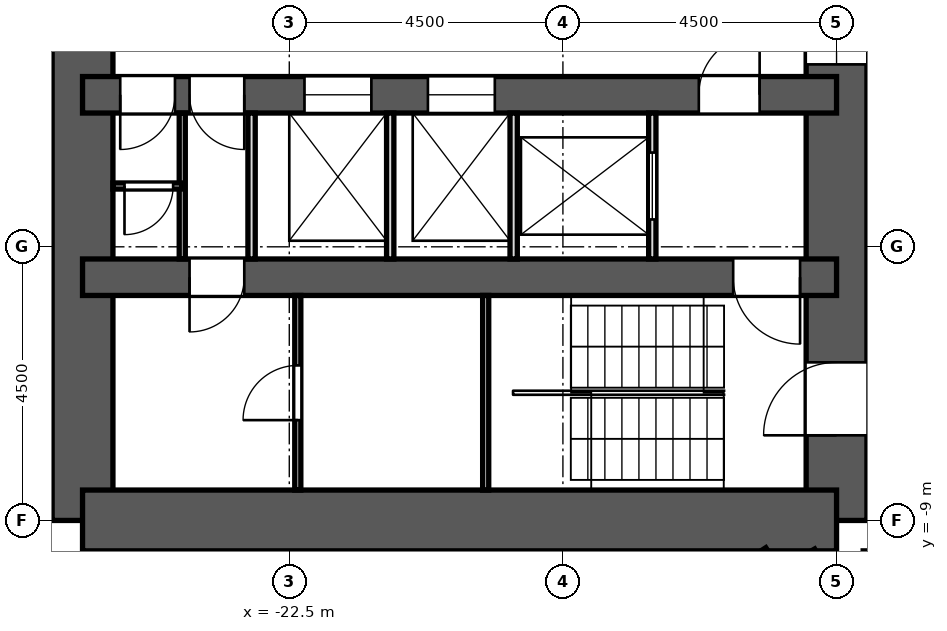
"""IFC4 building model, lengths in metres.
Left out: names, types, materials, properties, quantities, classifications, styles, units other than length and angle.
Written with IfcOpenShell. Run it as: python <this file> out.ifc"""

import sys

from ifc_helpers import new_model, si_unit, direction, frame, frame_2d, origin, place, context, subcontext, project, spatial, rectangle, extrude, element, fill, save


model = new_model("IFC4")
c1 = context("Model", 3, precision=1e-05, world=origin(), true_north=direction((0.0, 1.0)))
c2 = subcontext(c1, "Body", "Model", "MODEL_VIEW")
j1 = project(units=[si_unit("LENGTHUNIT", "METRE"), si_unit("PLANEANGLEUNIT", "RADIAN")], contexts=[c1])
p1 = place(None, origin())
s1 = spatial("IfcSite", under=j1, at=p1, CompositionType="ELEMENT")
p2 = place(p1, origin())
s2 = spatial("IfcBuilding", under=s1, at=p2, CompositionType="ELEMENT")
p3 = place(p2, frame((0.0, 0.0, 46.1)))
s3 = spatial("IfcBuildingStorey", under=s2, at=p3, CompositionType="ELEMENT", Elevation=46.1)
p4 = place(p3, frame((-13.5, -9.0, 0.0), z_axis=(0.0, 0.0, 1.0), x_axis=(0.0, 1.0, 0.0)))
e1 = element("IfcWall", 1, at=p4, inside=s3, PredefinedType="SHEAR", context=c2, shape_type="SweptSolid", body=[
    extrude(rectangle(XDim=18.0, YDim=1.0, at=frame_2d((9.0, 0.0))), origin(), (0.0, 0.0, 1.0), 3.3),
])
p5 = place(p4, frame((15.4, 0.0, 0.0)))
e2 = element("IfcOpeningElement", 2, at=p5, cuts=e1, PredefinedType="OPENING", context=c2, shape_type="SweptSolid", body=[
    extrude(rectangle(XDim=1.2, YDim=2.1, at=frame_2d((0.6, 1.05))), frame((0.0, 0.512, 0.0), z_axis=(0.0, -1.0, 0.0), x_axis=(1.0, 0.0, 0.0)), (0.0, 0.0, 1.0), 1.024),
])
p6 = place(p4, frame((1.4, 0.0, 0.0)))
e3 = element("IfcOpeningElement", 3, at=p6, cuts=e1, PredefinedType="OPENING", context=c2, shape_type="SweptSolid", body=[
    extrude(rectangle(XDim=1.2, YDim=2.1, at=frame_2d((0.6, 1.05))), frame((0.0, 0.512, 0.0), z_axis=(0.0, -1.0, 0.0), x_axis=(1.0, 0.0, 0.0)), (0.0, 0.0, 1.0), 1.024),
])
p7 = place(p4, frame((7.5, 0.0, 0.0)))
e4 = element("IfcOpeningElement", 4, at=p7, cuts=e1, PredefinedType="OPENING", context=c2, shape_type="SweptSolid", body=[
    extrude(rectangle(XDim=3.0, YDim=2.4, at=frame_2d((1.5, 1.2))), frame((0.0, 0.512, 0.0), z_axis=(0.0, -1.0, 0.0), x_axis=(1.0, 0.0, 0.0)), (0.0, 0.0, 1.0), 1.024),
])
p8 = place(p3, frame((-25.9, -9.0, 0.0), z_axis=(0.0, 0.0, 1.0), x_axis=(0.0, 1.0, 0.0)))
e5 = element("IfcWall", 5, at=p8, inside=s3, PredefinedType="SHEAR", context=c2, shape_type="SweptSolid", body=[
    extrude(rectangle(XDim=18.0, YDim=1.0, at=frame_2d((9.0, 0.0))), origin(), (0.0, 0.0, 1.0), 3.3),
])
p9 = place(p3, frame((-13.5, -9.0, 0.0), z_axis=(0.0, 0.0, 1.0), x_axis=(-1.0, 0.0, 0.0)))
e6 = element("IfcWall", 6, at=p9, inside=s3, PredefinedType="SHEAR", context=c2, shape_type="SweptSolid", body=[
    extrude(rectangle(XDim=12.4, YDim=1.0, at=frame_2d((6.2, 0.0))), origin(), (0.0, 0.0, 1.0), 3.3),
])
p10 = place(p3, frame((-13.5, -5.0, 0.0), z_axis=(0.0, 0.0, 1.0), x_axis=(-1.0, 0.0, 0.0)))
e7 = element("IfcWall", 7, at=p10, inside=s3, PredefinedType="SHEAR", context=c2, shape_type="SweptSolid", body=[
    extrude(rectangle(XDim=12.4, YDim=0.6, at=frame_2d((6.2, 0.0))), origin(), (0.0, 0.0, 1.0), 3.3),
])
p11 = place(p10, frame((9.74, 0.0, 0.0)))
e8 = element("IfcOpeningElement", 8, at=p11, cuts=e7, PredefinedType="OPENING", context=c2, shape_type="SweptSolid", body=[
    extrude(rectangle(XDim=0.9, YDim=2.1, at=frame_2d((0.45, 1.05))), frame((0.0, 0.312, 0.0), z_axis=(0.0, -1.0, 0.0), x_axis=(1.0, 0.0, 0.0)), (0.0, 0.0, 1.0), 0.624),
])
p12 = place(p10, frame((0.6, 0.0, 0.0)))
e9 = element("IfcOpeningElement", 9, at=p12, cuts=e7, PredefinedType="OPENING", context=c2, shape_type="SweptSolid", body=[
    extrude(rectangle(XDim=1.1, YDim=2.1, at=frame_2d((0.55, 1.05))), frame((0.0, 0.312, 0.0), z_axis=(0.0, -1.0, 0.0), x_axis=(1.0, 0.0, 0.0)), (0.0, 0.0, 1.0), 0.624),
])
p13 = place(p3, frame((-13.5, -2.0, 0.0), z_axis=(0.0, 0.0, 1.0), x_axis=(-1.0, 0.0, 0.0)))
e10 = element("IfcWall", 10, at=p13, inside=s3, PredefinedType="SHEAR", context=c2, shape_type="SweptSolid", body=[
    extrude(rectangle(XDim=12.4, YDim=0.6, at=frame_2d((6.2, 0.0))), origin(), (0.0, 0.0, 1.0), 3.3),
])
p14 = place(p13, frame((5.62, 0.0, 0.0)))
e11 = element("IfcOpeningElement", 11, at=p14, cuts=e10, PredefinedType="OPENING", context=c2, shape_type="SweptSolid", body=[
    extrude(rectangle(XDim=1.1, YDim=2.1, at=frame_2d((0.55, 1.05))), frame((0.0, 0.312, 0.0), z_axis=(0.0, -1.0, 0.0), x_axis=(1.0, 0.0, 0.0)), (0.0, 0.0, 1.0), 0.624),
])
p15 = place(p13, frame((7.65, 0.0, 0.0)))
e12 = element("IfcOpeningElement", 12, at=p15, cuts=e10, PredefinedType="OPENING", context=c2, shape_type="SweptSolid", body=[
    extrude(rectangle(XDim=1.1, YDim=2.1, at=frame_2d((0.55, 1.05))), frame((0.0, 0.312, 0.0), z_axis=(0.0, -1.0, 0.0), x_axis=(1.0, 0.0, 0.0)), (0.0, 0.0, 1.0), 0.624),
])
p16 = place(p13, frame((1.265, 0.0, 0.0)))
e13 = element("IfcOpeningElement", 13, at=p16, cuts=e10, PredefinedType="OPENING", context=c2, shape_type="SweptSolid", body=[
    extrude(rectangle(XDim=1.0, YDim=2.1, at=frame_2d((0.5, 1.05))), frame((0.0, 0.312, 0.0), z_axis=(0.0, -1.0, 0.0), x_axis=(1.0, 0.0, 0.0)), (0.0, 0.0, 1.0), 0.624),
])
p17 = place(p13, frame((9.74, 0.0, 0.0)))
e14 = element("IfcOpeningElement", 14, at=p17, cuts=e10, PredefinedType="OPENING", context=c2, shape_type="SweptSolid", body=[
    extrude(rectangle(XDim=0.9, YDim=2.1, at=frame_2d((0.45, 1.05))), frame((0.0, 0.312, 0.0), z_axis=(0.0, -1.0, 0.0), x_axis=(1.0, 0.0, 0.0)), (0.0, 0.0, 1.0), 0.624),
])
p18 = place(p13, frame((10.88, 0.0, 0.0)))
e15 = element("IfcOpeningElement", 15, at=p18, cuts=e10, PredefinedType="OPENING", context=c2, shape_type="SweptSolid", body=[
    extrude(rectangle(XDim=0.9, YDim=2.1, at=frame_2d((0.45, 1.05))), frame((0.0, 0.312, 0.0), z_axis=(0.0, -1.0, 0.0), x_axis=(1.0, 0.0, 0.0)), (0.0, 0.0, 1.0), 0.624),
])
p19 = place(p3, frame((-27.523, -7.971, 0.0), z_axis=(0.0, 0.0, 1.0), x_axis=(0.342028474173, -0.939689588564, 0.0)))
e16 = element("IfcWall", 16, at=p19, inside=s3, PredefinedType="SOLIDWALL", context=c2, shape_type="SweptSolid", body=[
    extrude(rectangle(XDim=3.846, YDim=0.6, at=frame_2d((1.923, 0.0))), origin(), (0.0, 0.0, 1.0), 2.75),
])
p20 = place(p3, frame((-13.914, -9.5, 0.0), z_axis=(0.0, 0.0, 1.0), x_axis=(0.500066958712, -0.865986741702, 0.0)))
e17 = element("IfcWall", 17, at=p20, inside=s3, PredefinedType="PARTITIONING", context=c2, shape_type="SweptSolid", body=[
    extrude(rectangle(XDim=1.738, YDim=0.125, at=frame_2d((0.869, 0.0))), origin(), (0.0, 0.0, 1.0), 2.75),
])
p21 = place(p3, frame((-15.905, -10.328, 0.0), z_axis=(0.0, 0.0, 1.0), x_axis=(0.83882853689, 0.544395706908, 0.0)))
e18 = element("IfcWall", 18, at=p21, inside=s3, PredefinedType="PARTITIONING", context=c2, shape_type="SweptSolid", body=[
    extrude(rectangle(XDim=1.521, YDim=0.125, at=frame_2d((0.76, 0.0))), origin(), (0.0, 0.0, 1.0), 2.75),
])
p22 = place(p3, frame((-16.53, -4.7, 0.0), z_axis=(0.0, 0.0, 1.0), x_axis=(0.0, 1.0, 0.0)))
e19 = element("IfcWall", 19, at=p22, inside=s3, PredefinedType="PARTITIONING", context=c2, shape_type="SweptSolid", body=[
    extrude(rectangle(XDim=2.4, YDim=0.12, at=frame_2d((1.2, 0.0))), origin(), (0.0, 0.0, 1.0), 2.75),
])
p23 = place(p22, frame((0.65, 0.0, 0.0)))
e20 = element("IfcOpeningElement", 20, at=p23, cuts=e19, PredefinedType="OPENING", context=c2, shape_type="SweptSolid", body=[
    extrude(rectangle(XDim=1.1, YDim=2.1, at=frame_2d((0.55, 1.05))), frame((0.0, 0.072, 0.0), z_axis=(0.0, -1.0, 0.0), x_axis=(1.0, 0.0, 0.0)), (0.0, 0.0, 1.0), 0.144),
])
for number, where, z_axis, x_axis in (
    (21, (-18.81, -4.7, 0.0), (0.0, 0.0, 1.0), (0.0, 1.0, 0.0)),
    (22, (-20.84, -4.7, 0.0), (0.0, 0.0, 1.0), (0.0, 1.0, 0.0)),
    (23, (-23.12, -4.7, 0.0), (0.0, 0.0, 1.0), (0.0, 1.0, 0.0)),
):
    element("IfcWall", number, at=place(p3, frame(where, z_axis=z_axis, x_axis=x_axis)), inside=s3, PredefinedType="PARTITIONING", context=c2, shape_type="SweptSolid", body=[
        extrude(rectangle(XDim=2.4, YDim=0.12, at=frame_2d((1.2, 0.0))), origin(), (0.0, 0.0, 1.0), 2.75),
    ])
p24 = place(p3, frame((-24.26, -4.7, 0.0), z_axis=(0.0, 0.0, 1.0), x_axis=(0.0, 1.0, 0.0)))
e24 = element("IfcWall", 24, at=p24, inside=s3, PredefinedType="PARTITIONING", context=c2, shape_type="SweptSolid", body=[
    extrude(rectangle(XDim=2.4, YDim=0.1, at=frame_2d((1.2, 0.0))), origin(), (0.0, 0.0, 1.0), 2.75),
])
p25 = place(p3, frame((-24.26, -3.5, 0.0), z_axis=(0.0, 0.0, 1.0), x_axis=(-1.0, 0.0, 0.0)))
e25 = element("IfcWall", 25, at=p25, inside=s3, PredefinedType="PARTITIONING", context=c2, shape_type="SweptSolid", body=[
    extrude(rectangle(XDim=1.14, YDim=0.1, at=frame_2d((0.57, 0.0))), origin(), (0.0, 0.0, 1.0), 2.75),
])
p26 = place(p25, frame((0.15, 0.0, 0.0)))
e26 = element("IfcOpeningElement", 26, at=p26, cuts=e25, PredefinedType="OPENING", context=c2, shape_type="SweptSolid", body=[
    extrude(rectangle(XDim=0.8, YDim=2.1, at=frame_2d((0.4, 1.05))), frame((0.0, 0.062, 0.0), z_axis=(0.0, -1.0, 0.0), x_axis=(1.0, 0.0, 0.0)), (0.0, 0.0, 1.0), 0.124),
])
p27 = place(p3, frame((-19.27, -8.5, 0.0), z_axis=(0.0, 0.0, 1.0), x_axis=(0.0, 1.0, 0.0)))
e27 = element("IfcWall", 27, at=p27, inside=s3, PredefinedType="PARTITIONING", context=c2, shape_type="SweptSolid", body=[
    extrude(rectangle(XDim=3.2, YDim=0.1, at=frame_2d((1.6, 0.0))), origin(), (0.0, 0.0, 1.0), 2.75),
])
p28 = place(p3, frame((-22.36, -8.5, 0.0), z_axis=(0.0, 0.0, 1.0), x_axis=(0.0, 1.0, 0.0)))
e28 = element("IfcWall", 28, at=p28, inside=s3, PredefinedType="PARTITIONING", context=c2, shape_type="SweptSolid", body=[
    extrude(rectangle(XDim=3.2, YDim=0.1, at=frame_2d((1.6, 0.0))), origin(), (0.0, 0.0, 1.0), 2.75),
])
p29 = place(p28, frame((1.15, 0.0, 0.0)))
e29 = element("IfcOpeningElement", 29, at=p29, cuts=e28, PredefinedType="OPENING", context=c2, shape_type="SweptSolid", body=[
    extrude(rectangle(XDim=0.9, YDim=2.1, at=frame_2d((0.45, 1.05))), frame((0.0, 0.062, 0.0), z_axis=(0.0, -1.0, 0.0), x_axis=(1.0, 0.0, 0.0)), (0.0, 0.0, 1.0), 0.124),
])
p30 = place(p23, origin())
e30 = element("IfcDoor", 30, at=p30, inside=s3, OperationType="DOUBLE_DOOR_SLIDING", PredefinedType="DOOR", context=c2, shape_type="SweptSolid", body=[
    extrude(rectangle(XDim=1.1, YDim=2.1, at=frame_2d((0.55, 1.05))), frame((0.0, 0.025, 0.0), z_axis=(0.0, -1.0, 0.0), x_axis=(1.0, 0.0, 0.0)), (0.0, 0.0, 1.0), 0.05),
])
fill(e20, e30)
p31 = place(p14, origin())
e31 = element("IfcDoor", 31, at=p31, inside=s3, OperationType="DOUBLE_DOOR_SLIDING", PredefinedType="DOOR", context=c2, shape_type="SweptSolid", body=[
    extrude(rectangle(XDim=1.1, YDim=2.1, at=frame_2d((0.55, 1.05))), frame((0.0, 0.025, 0.0), z_axis=(0.0, -1.0, 0.0), x_axis=(1.0, 0.0, 0.0)), (0.0, 0.0, 1.0), 0.05),
])
fill(e11, e31)
p32 = place(p15, origin())
e32 = element("IfcDoor", 32, at=p32, inside=s3, OperationType="DOUBLE_DOOR_SLIDING", PredefinedType="DOOR", context=c2, shape_type="SweptSolid", body=[
    extrude(rectangle(XDim=1.1, YDim=2.1, at=frame_2d((0.55, 1.05))), frame((0.0, 0.025, 0.0), z_axis=(0.0, -1.0, 0.0), x_axis=(1.0, 0.0, 0.0)), (0.0, 0.0, 1.0), 0.05),
])
fill(e12, e32)
p33 = place(p16, frame((1.0, 0.0, 0.0), z_axis=(0.0, 0.0, 1.0), x_axis=(-1.0, 0.0, 0.0)))
e33 = element("IfcDoor", 33, at=p33, inside=s3, OperationType="SINGLE_SWING_RIGHT", PredefinedType="DOOR", context=c2, shape_type="SweptSolid", body=[
    extrude(rectangle(XDim=1.0, YDim=2.1, at=frame_2d((0.5, 1.05))), frame((0.0, 0.025, 0.0), z_axis=(0.0, -1.0, 0.0), x_axis=(1.0, 0.0, 0.0)), (0.0, 0.0, 1.0), 0.05),
])
fill(e13, e33)
p34 = place(p17, origin())
e34 = element("IfcDoor", 34, at=p34, inside=s3, OperationType="SINGLE_SWING_LEFT", PredefinedType="DOOR", context=c2, shape_type="SweptSolid", body=[
    extrude(rectangle(XDim=0.9, YDim=2.1, at=frame_2d((0.45, 1.05))), frame((0.0, 0.025, 0.0), z_axis=(0.0, -1.0, 0.0), x_axis=(1.0, 0.0, 0.0)), (0.0, 0.0, 1.0), 0.05),
])
fill(e14, e34)
p35 = place(p18, origin())
e35 = element("IfcDoor", 35, at=p35, inside=s3, OperationType="SINGLE_SWING_RIGHT", PredefinedType="DOOR", context=c2, shape_type="SweptSolid", body=[
    extrude(rectangle(XDim=0.9, YDim=2.1, at=frame_2d((0.45, 1.05))), frame((0.0, 0.025, 0.0), z_axis=(0.0, -1.0, 0.0), x_axis=(1.0, 0.0, 0.0)), (0.0, 0.0, 1.0), 0.05),
])
fill(e15, e35)
p36 = place(p26, origin())
e36 = element("IfcDoor", 36, at=p36, inside=s3, OperationType="SINGLE_SWING_RIGHT", PredefinedType="DOOR", context=c2, shape_type="SweptSolid", body=[
    extrude(rectangle(XDim=0.8, YDim=2.1, at=frame_2d((0.4, 1.05))), frame((0.0, 0.025, 0.0), z_axis=(0.0, -1.0, 0.0), x_axis=(1.0, 0.0, 0.0)), (0.0, 0.0, 1.0), 0.05),
])
fill(e26, e36)
p37 = place(p29, origin())
e37 = element("IfcDoor", 37, at=p37, inside=s3, OperationType="SINGLE_SWING_LEFT", PredefinedType="DOOR", context=c2, shape_type="SweptSolid", body=[
    extrude(rectangle(XDim=0.9, YDim=2.1, at=frame_2d((0.45, 1.05))), frame((0.0, 0.025, 0.0), z_axis=(0.0, -1.0, 0.0), x_axis=(1.0, 0.0, 0.0)), (0.0, 0.0, 1.0), 0.05),
])
fill(e29, e37)
p38 = place(p11, origin())
e38 = element("IfcDoor", 38, at=p38, inside=s3, OperationType="SINGLE_SWING_RIGHT", PredefinedType="DOOR", context=c2, shape_type="SweptSolid", body=[
    extrude(rectangle(XDim=0.9, YDim=2.1, at=frame_2d((0.45, 1.05))), frame((0.0, 0.025, 0.0), z_axis=(0.0, -1.0, 0.0), x_axis=(1.0, 0.0, 0.0)), (0.0, 0.0, 1.0), 0.05),
])
fill(e8, e38)
p39 = place(p12, origin())
e39 = element("IfcDoor", 39, at=p39, inside=s3, OperationType="SINGLE_SWING_LEFT", PredefinedType="DOOR", context=c2, shape_type="SweptSolid", body=[
    extrude(rectangle(XDim=1.1, YDim=2.1, at=frame_2d((0.55, 1.05))), frame((0.0, 0.025, 0.0), z_axis=(0.0, -1.0, 0.0), x_axis=(1.0, 0.0, 0.0)), (0.0, 0.0, 1.0), 0.05),
])
fill(e9, e39)
p40 = place(p6, origin())
e40 = element("IfcDoor", 40, at=p40, inside=s3, OperationType="SINGLE_SWING_LEFT", PredefinedType="DOOR", context=c2, shape_type="SweptSolid", body=[
    extrude(rectangle(XDim=1.2, YDim=2.1, at=frame_2d((0.6, 1.05))), frame((0.0, 0.025, 0.0), z_axis=(0.0, -1.0, 0.0), x_axis=(1.0, 0.0, 0.0)), (0.0, 0.0, 1.0), 0.05),
])
fill(e3, e40)
p41 = place(p7, origin())
e41 = element("IfcDoor", 41, at=p41, inside=s3, OperationType="DOUBLE_DOOR_SLIDING", PredefinedType="DOOR", context=c2, shape_type="SweptSolid", body=[
    extrude(rectangle(XDim=3.0, YDim=2.4, at=frame_2d((1.5, 1.2))), frame((0.0, 0.025, 0.0), z_axis=(0.0, -1.0, 0.0), x_axis=(1.0, 0.0, 0.0)), (0.0, 0.0, 1.0), 0.05),
])
fill(e4, e41)
save(model, sys.argv[1])
